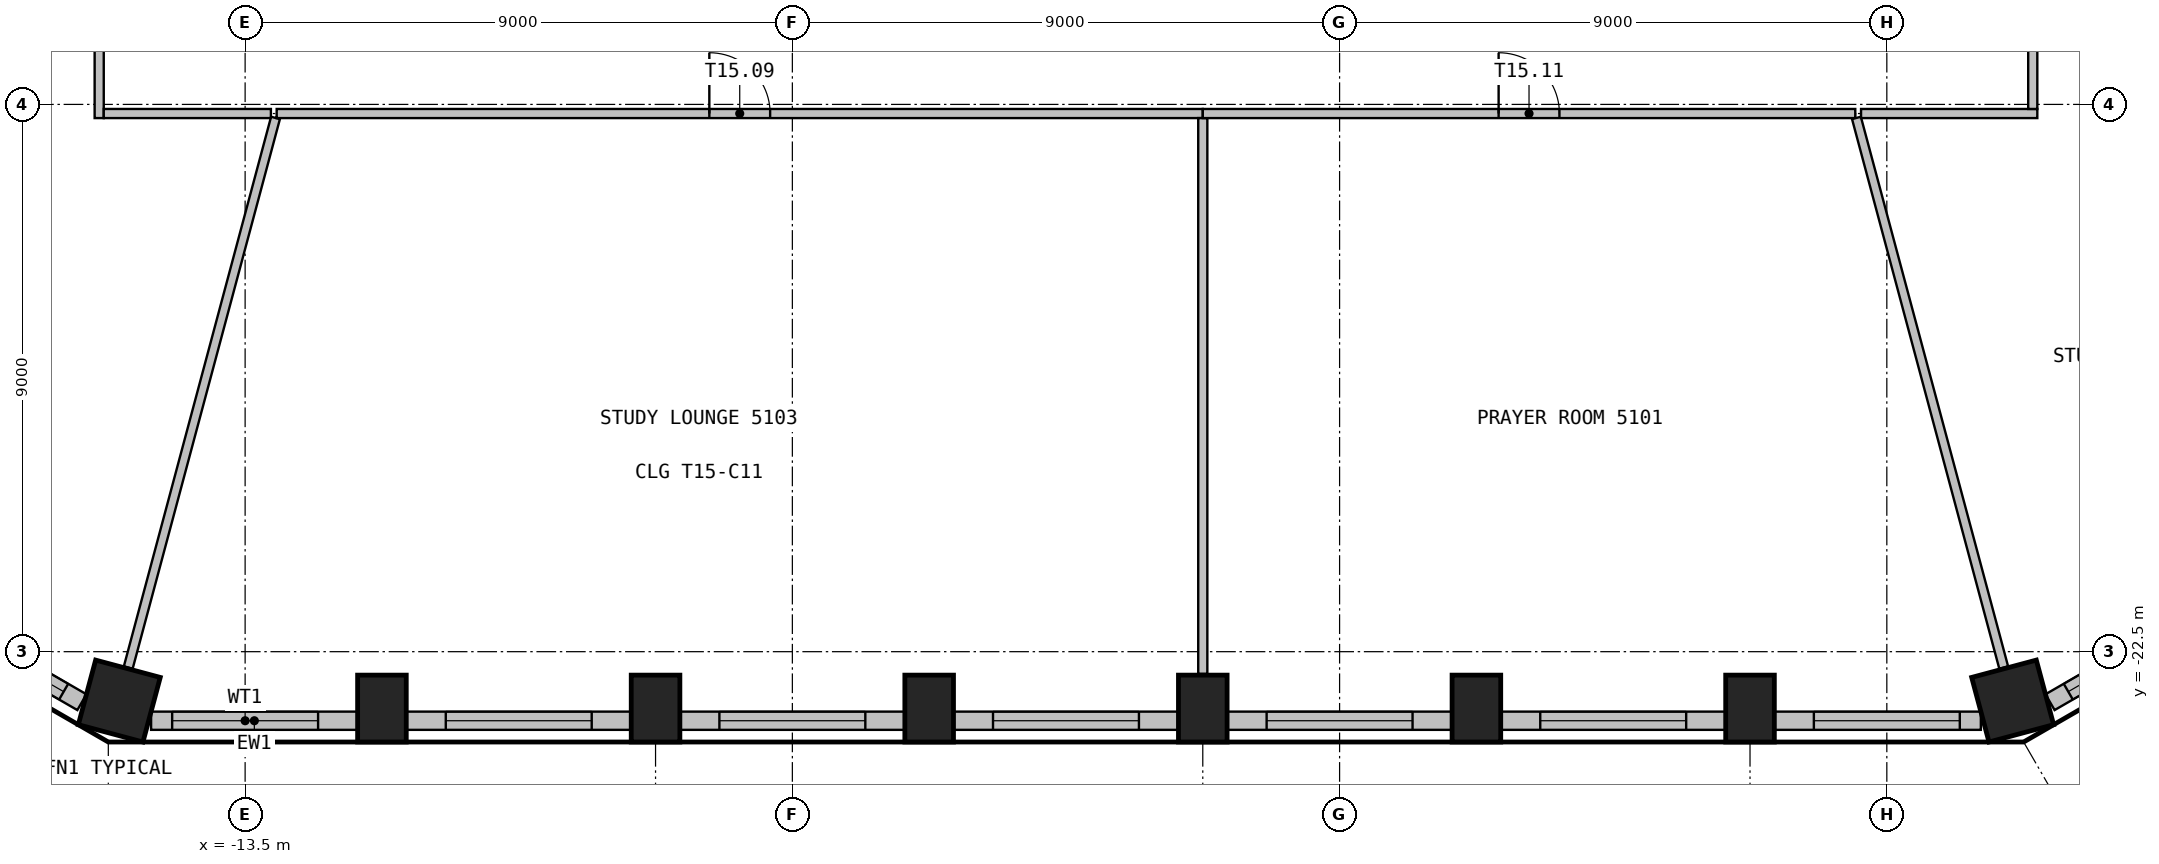
"""IFC4 building model, lengths in metres.
Left out: names, types, materials, properties, quantities, classifications, styles, units other than length and angle.
Written with IfcOpenShell. Run it as: python <this file> out.ifc"""

import sys

from ifc_helpers import new_model, si_unit, direction, frame, frame_2d, origin, origin_2d, place, context, subcontext, project, spatial, rectangle, extrude, element, fill, save


model = new_model("IFC4")
c1 = context("Model", 3, precision=1e-05, world=origin(), true_north=direction((0.0, 1.0)))
c2 = subcontext(c1, "Body", "Model", "MODEL_VIEW")
j1 = project(units=[si_unit("LENGTHUNIT", "METRE"), si_unit("PLANEANGLEUNIT", "RADIAN")], contexts=[c1])
p1 = place(None, origin())
s1 = spatial("IfcSite", under=j1, at=p1, CompositionType="ELEMENT")
p2 = place(p1, origin())
s2 = spatial("IfcBuilding", under=s1, at=p2, CompositionType="ELEMENT")
p3 = place(p2, frame((0.0, 0.0, 207.3)))
s3 = spatial("IfcBuildingStorey", under=s2, at=p3, CompositionType="ELEMENT", Elevation=207.3)
p4 = place(p3, frame((-15.57, -23.312, 0.0), z_axis=(0.0, 0.0, 1.0), x_axis=(0.965925826289, -0.258819045103, 0.0)))
e1 = element("IfcColumn", 1, at=p4, inside=s3, PredefinedType="COLUMN", context=c2, shape_type="SweptSolid", body=[
    extrude(rectangle(XDim=1.1, YDim=1.1, at=origin_2d()), origin(), (0.0, 0.0, 1.0), 3.55),
])
for number, where, z_axis, x_axis in (
    (2, (-11.25, -23.436, 0.0), (0.0, 0.0, 1.0), (1.0, 0.0, 0.0)),
    (3, (-6.75, -23.436, 0.0), (0.0, 0.0, 1.0), (1.0, 0.0, 0.0)),
    (4, (-2.25, -23.436, 0.0), (0.0, 0.0, 1.0), (1.0, 0.0, 0.0)),
    (5, (2.25, -23.436, 0.0), (0.0, 0.0, 1.0), (1.0, 0.0, 0.0)),
    (6, (6.75, -23.436, 0.0), (0.0, 0.0, 1.0), (1.0, 0.0, 0.0)),
    (7, (11.25, -23.436, 0.0), (0.0, 0.0, 1.0), (1.0, 0.0, 0.0)),
):
    element("IfcColumn", number, at=place(p3, frame(where, z_axis=z_axis, x_axis=x_axis)), inside=s3, PredefinedType="COLUMN", context=c2, shape_type="SweptSolid", body=[
        extrude(rectangle(XDim=0.8, YDim=1.1, at=origin_2d()), origin(), (0.0, 0.0, 1.0), 3.55),
    ])
p5 = place(p3, frame((15.57, -23.312, 0.0), z_axis=(0.0, 0.0, 1.0), x_axis=(0.965925826289, 0.258819045103, 0.0)))
e8 = element("IfcColumn", 8, at=p5, inside=s3, PredefinedType="COLUMN", context=c2, shape_type="SweptSolid", body=[
    extrude(rectangle(XDim=1.1, YDim=1.1, at=origin_2d()), origin(), (0.0, 0.0, 1.0), 3.55),
])
p6 = place(p3, frame((-15.046, -23.635, 0.0), z_axis=(0.0, 0.0, 1.0), x_axis=(1.0, 0.0, 0.0)))
e9 = element("IfcWall", 9, at=p6, inside=s3, PredefinedType="SOLIDWALL", context=c2, shape_type="SweptSolid", body=[
    extrude(rectangle(XDim=3.396, YDim=0.3, at=frame_2d((1.698, 0.0))), origin(), (0.0, 0.0, 1.0), 3.55),
])
p7 = place(p6, frame((0.346, 0.0, 0.9)))
e10 = element("IfcOpeningElement", 10, at=p7, cuts=e9, PredefinedType="OPENING", context=c2, shape_type="SweptSolid", body=[
    extrude(rectangle(XDim=2.4, YDim=2.1, at=frame_2d((1.2, 1.05))), frame((0.0, 0.16, 0.0), z_axis=(0.0, -1.0, 0.0), x_axis=(1.0, 0.0, 0.0)), (0.0, 0.0, 1.0), 0.32),
])
p8 = place(p3, frame((-10.85, -23.635, 0.0), z_axis=(0.0, 0.0, 1.0), x_axis=(1.0, 0.0, 0.0)))
e11 = element("IfcWall", 11, at=p8, inside=s3, PredefinedType="SOLIDWALL", context=c2, shape_type="SweptSolid", body=[
    extrude(rectangle(XDim=3.699, YDim=0.3, at=frame_2d((1.85, 0.0))), origin(), (0.0, 0.0, 1.0), 3.55),
])
p9 = place(p8, frame((0.649, 0.0, 0.9)))
e12 = element("IfcOpeningElement", 12, at=p9, cuts=e11, PredefinedType="OPENING", context=c2, shape_type="SweptSolid", body=[
    extrude(rectangle(XDim=2.4, YDim=2.1, at=frame_2d((1.2, 1.05))), frame((0.0, 0.16, 0.0), z_axis=(0.0, -1.0, 0.0), x_axis=(1.0, 0.0, 0.0)), (0.0, 0.0, 1.0), 0.32),
])
p10 = place(p3, frame((-6.35, -23.635, 0.0), z_axis=(0.0, 0.0, 1.0), x_axis=(1.0, 0.0, 0.0)))
e13 = element("IfcWall", 13, at=p10, inside=s3, PredefinedType="SOLIDWALL", context=c2, shape_type="SweptSolid", body=[
    extrude(rectangle(XDim=3.699, YDim=0.3, at=frame_2d((1.85, 0.0))), origin(), (0.0, 0.0, 1.0), 3.55),
])
p11 = place(p10, frame((0.649, 0.0, 0.9)))
e14 = element("IfcOpeningElement", 14, at=p11, cuts=e13, PredefinedType="OPENING", context=c2, shape_type="SweptSolid", body=[
    extrude(rectangle(XDim=2.4, YDim=2.1, at=frame_2d((1.2, 1.05))), frame((0.0, 0.16, 0.0), z_axis=(0.0, -1.0, 0.0), x_axis=(1.0, 0.0, 0.0)), (0.0, 0.0, 1.0), 0.32),
])
p12 = place(p3, frame((-1.85, -23.635, 0.0), z_axis=(0.0, 0.0, 1.0), x_axis=(1.0, 0.0, 0.0)))
e15 = element("IfcWall", 15, at=p12, inside=s3, PredefinedType="SOLIDWALL", context=c2, shape_type="SweptSolid", body=[
    extrude(rectangle(XDim=3.699, YDim=0.3, at=frame_2d((1.85, 0.0))), origin(), (0.0, 0.0, 1.0), 3.55),
])
p13 = place(p12, frame((0.649, 0.0, 0.9)))
e16 = element("IfcOpeningElement", 16, at=p13, cuts=e15, PredefinedType="OPENING", context=c2, shape_type="SweptSolid", body=[
    extrude(rectangle(XDim=2.4, YDim=2.1, at=frame_2d((1.2, 1.05))), frame((0.0, 0.16, 0.0), z_axis=(0.0, -1.0, 0.0), x_axis=(1.0, 0.0, 0.0)), (0.0, 0.0, 1.0), 0.32),
])
p14 = place(p3, frame((2.65, -23.635, 0.0), z_axis=(0.0, 0.0, 1.0), x_axis=(1.0, 0.0, 0.0)))
e17 = element("IfcWall", 17, at=p14, inside=s3, PredefinedType="SOLIDWALL", context=c2, shape_type="SweptSolid", body=[
    extrude(rectangle(XDim=3.699, YDim=0.3, at=frame_2d((1.85, 0.0))), origin(), (0.0, 0.0, 1.0), 3.55),
])
p15 = place(p14, frame((0.649, 0.0, 0.9)))
e18 = element("IfcOpeningElement", 18, at=p15, cuts=e17, PredefinedType="OPENING", context=c2, shape_type="SweptSolid", body=[
    extrude(rectangle(XDim=2.4, YDim=2.1, at=frame_2d((1.2, 1.05))), frame((0.0, 0.16, 0.0), z_axis=(0.0, -1.0, 0.0), x_axis=(1.0, 0.0, 0.0)), (0.0, 0.0, 1.0), 0.32),
])
p16 = place(p3, frame((7.15, -23.635, 0.0), z_axis=(0.0, 0.0, 1.0), x_axis=(1.0, 0.0, 0.0)))
e19 = element("IfcWall", 19, at=p16, inside=s3, PredefinedType="SOLIDWALL", context=c2, shape_type="SweptSolid", body=[
    extrude(rectangle(XDim=3.699, YDim=0.3, at=frame_2d((1.85, 0.0))), origin(), (0.0, 0.0, 1.0), 3.55),
])
p17 = place(p16, frame((0.649, 0.0, 0.9)))
e20 = element("IfcOpeningElement", 20, at=p17, cuts=e19, PredefinedType="OPENING", context=c2, shape_type="SweptSolid", body=[
    extrude(rectangle(XDim=2.4, YDim=2.1, at=frame_2d((1.2, 1.05))), frame((0.0, 0.16, 0.0), z_axis=(0.0, -1.0, 0.0), x_axis=(1.0, 0.0, 0.0)), (0.0, 0.0, 1.0), 0.32),
])
p18 = place(p3, frame((11.65, -23.635, 0.0), z_axis=(0.0, 0.0, 1.0), x_axis=(1.0, 0.0, 0.0)))
e21 = element("IfcWall", 21, at=p18, inside=s3, PredefinedType="SOLIDWALL", context=c2, shape_type="SweptSolid", body=[
    extrude(rectangle(XDim=3.396, YDim=0.3, at=frame_2d((1.698, 0.0))), origin(), (0.0, 0.0, 1.0), 3.55),
])
p19 = place(p18, frame((0.649, 0.0, 0.9)))
e22 = element("IfcOpeningElement", 22, at=p19, cuts=e21, PredefinedType="OPENING", context=c2, shape_type="SweptSolid", body=[
    extrude(rectangle(XDim=2.4, YDim=2.1, at=frame_2d((1.2, 1.05))), frame((0.0, 0.16, 0.0), z_axis=(0.0, -1.0, 0.0), x_axis=(1.0, 0.0, 0.0)), (0.0, 0.0, 1.0), 0.32),
])
p20 = place(p3, frame((16.184, -23.331, 0.0), z_axis=(0.0, 0.0, 1.0), x_axis=(0.865994975416, 0.500052699777, 0.0)))
e23 = element("IfcWall", 23, at=p20, inside=s3, PredefinedType="SOLIDWALL", context=c2, shape_type="SweptSolid", body=[
    extrude(rectangle(XDim=3.093, YDim=0.3, at=frame_2d((1.546, 0.0))), origin(), (0.0, 0.0, 1.0), 3.55),
])
p21 = place(p20, frame((0.346, 0.0, 0.9)))
e24 = element("IfcOpeningElement", 24, at=p21, cuts=e23, PredefinedType="OPENING", context=c2, shape_type="SweptSolid", body=[
    extrude(rectangle(XDim=2.4, YDim=2.1, at=frame_2d((1.2, 1.05))), frame((0.0, 0.16, 0.0), z_axis=(0.0, -1.0, 0.0), x_axis=(1.0, 0.0, 0.0)), (0.0, 0.0, 1.0), 0.32),
])
p22 = place(p3, frame((-18.863, -21.784, 0.0), z_axis=(0.0, 0.0, 1.0), x_axis=(0.865994975416, -0.500052699777, 0.0)))
e25 = element("IfcWall", 25, at=p22, inside=s3, PredefinedType="SOLIDWALL", context=c2, shape_type="SweptSolid", body=[
    extrude(rectangle(XDim=3.093, YDim=0.3, at=frame_2d((1.546, 0.0))), origin(), (0.0, 0.0, 1.0), 3.55),
])
p23 = place(p22, frame((0.346, 0.0, 0.9)))
e26 = element("IfcOpeningElement", 26, at=p23, cuts=e25, PredefinedType="OPENING", context=c2, shape_type="SweptSolid", body=[
    extrude(rectangle(XDim=2.4, YDim=2.1, at=frame_2d((1.2, 1.05))), frame((0.0, 0.16, 0.0), z_axis=(0.0, -1.0, 0.0), x_axis=(1.0, 0.0, 0.0)), (0.0, 0.0, 1.0), 0.32),
])
p24 = place(p3, frame((-15.9, -2.325, 0.0), z_axis=(0.0, 0.0, 1.0), x_axis=(0.0, -1.0, 0.0)))
e27 = element("IfcWall", 27, at=p24, inside=s3, PredefinedType="PARTITIONING", context=c2, shape_type="SweptSolid", body=[
    extrude(rectangle(XDim=11.4, YDim=0.15, at=frame_2d((5.7, 0.0))), origin(), (0.0, 0.0, 1.0), 3.55),
])
p25 = place(p24, frame((5.2, 0.0, 0.0)))
e28 = element("IfcOpeningElement", 28, at=p25, cuts=e27, PredefinedType="OPENING", context=c2, shape_type="SweptSolid", body=[
    extrude(rectangle(XDim=1.0, YDim=2.1, at=frame_2d((0.5, 1.05))), frame((0.0, 0.085, 0.0), z_axis=(0.0, -1.0, 0.0), x_axis=(1.0, 0.0, 0.0)), (0.0, 0.0, 1.0), 0.17),
])
p26 = place(p3, frame((-15.825, -13.65, 0.0), z_axis=(0.0, 0.0, 1.0), x_axis=(1.0, 0.0, 0.0)))
e29 = element("IfcWall", 29, at=p26, inside=s3, PredefinedType="PARTITIONING", context=c2, shape_type="SweptSolid", body=[
    extrude(rectangle(XDim=2.749, YDim=0.15, at=frame_2d((1.375, 0.0))), origin(), (0.0, 0.0, 1.0), 3.55),
])
p27 = place(p3, frame((-13.0, -13.722, 0.0), z_axis=(0.0, 0.0, 1.0), x_axis=(-0.258812157425, -0.96592767181, 0.0)))
e30 = element("IfcWall", 30, at=p27, inside=s3, PredefinedType="PARTITIONING", context=c2, shape_type="SweptSolid", body=[
    extrude(rectangle(XDim=9.358, YDim=0.15, at=frame_2d((4.679, 0.0))), origin(), (0.0, 0.0, 1.0), 3.55),
])
p28 = place(p3, frame((-12.981, -13.65, 0.0), z_axis=(0.0, 0.0, 1.0), x_axis=(1.0, 0.0, 0.0)))
e31 = element("IfcWall", 31, at=p28, inside=s3, PredefinedType="PARTITIONING", context=c2, shape_type="SweptSolid", body=[
    extrude(rectangle(XDim=15.231, YDim=0.15, at=frame_2d((7.615, 0.0))), origin(), (0.0, 0.0, 1.0), 3.55),
])
p29 = place(p28, frame((7.115, 0.0, 0.0)))
e32 = element("IfcOpeningElement", 32, at=p29, cuts=e31, PredefinedType="OPENING", context=c2, shape_type="SweptSolid", body=[
    extrude(rectangle(XDim=1.0, YDim=2.1, at=frame_2d((0.5, 1.05))), frame((0.0, 0.085, 0.0), z_axis=(0.0, -1.0, 0.0), x_axis=(1.0, 0.0, 0.0)), (0.0, 0.0, 1.0), 0.17),
])
p30 = place(p3, frame((2.25, -13.725, 0.0), z_axis=(0.0, 0.0, 1.0), x_axis=(0.0, -1.0, 0.0)))
e33 = element("IfcWall", 33, at=p30, inside=s3, PredefinedType="PARTITIONING", context=c2, shape_type="SweptSolid", body=[
    extrude(rectangle(XDim=9.14, YDim=0.15, at=frame_2d((4.57, 0.0))), origin(), (0.0, 0.0, 1.0), 3.55),
])
p31 = place(p3, frame((2.25, -13.65, 0.0), z_axis=(0.0, 0.0, 1.0), x_axis=(1.0, 0.0, 0.0)))
e34 = element("IfcWall", 34, at=p31, inside=s3, PredefinedType="PARTITIONING", context=c2, shape_type="SweptSolid", body=[
    extrude(rectangle(XDim=10.731, YDim=0.15, at=frame_2d((5.365, 0.0))), origin(), (0.0, 0.0, 1.0), 3.55),
])
p32 = place(p31, frame((4.865, 0.0, 0.0)))
e35 = element("IfcOpeningElement", 35, at=p32, cuts=e34, PredefinedType="OPENING", context=c2, shape_type="SweptSolid", body=[
    extrude(rectangle(XDim=1.0, YDim=2.1, at=frame_2d((0.5, 1.05))), frame((0.0, 0.085, 0.0), z_axis=(0.0, -1.0, 0.0), x_axis=(1.0, 0.0, 0.0)), (0.0, 0.0, 1.0), 0.17),
])
p33 = place(p3, frame((13.0, -13.722, 0.0), z_axis=(0.0, 0.0, 1.0), x_axis=(0.258812157425, -0.96592767181, 0.0)))
e36 = element("IfcWall", 36, at=p33, inside=s3, PredefinedType="PARTITIONING", context=c2, shape_type="SweptSolid", body=[
    extrude(rectangle(XDim=9.358, YDim=0.15, at=frame_2d((4.679, 0.0))), origin(), (0.0, 0.0, 1.0), 3.55),
])
p34 = place(p3, frame((13.076, -13.65, 0.0), z_axis=(0.0, 0.0, 1.0), x_axis=(1.0, 0.0, 0.0)))
e37 = element("IfcWall", 37, at=p34, inside=s3, PredefinedType="PARTITIONING", context=c2, shape_type="SweptSolid", body=[
    extrude(rectangle(XDim=2.899, YDim=0.15, at=frame_2d((1.45, 0.0))), origin(), (0.0, 0.0, 1.0), 3.55),
])
p35 = place(p3, frame((15.9, -13.575, 0.0), z_axis=(0.0, 0.0, 1.0), x_axis=(0.0, 1.0, 0.0)))
e38 = element("IfcWall", 38, at=p35, inside=s3, PredefinedType="PARTITIONING", context=c2, shape_type="SweptSolid", body=[
    extrude(rectangle(XDim=4.265, YDim=0.15, at=frame_2d((2.132, 0.0))), origin(), (0.0, 0.0, 1.0), 3.55),
])
p36 = place(p35, frame((1.633, 0.0, 0.0)))
e39 = element("IfcOpeningElement", 39, at=p36, cuts=e38, PredefinedType="OPENING", context=c2, shape_type="SweptSolid", body=[
    extrude(rectangle(XDim=1.0, YDim=2.1, at=frame_2d((0.5, 1.05))), frame((0.0, 0.085, 0.0), z_axis=(0.0, -1.0, 0.0), x_axis=(1.0, 0.0, 0.0)), (0.0, 0.0, 1.0), 0.17),
])
p37 = place(p7, origin())
e40 = element("IfcWindow", 40, at=p37, inside=s3, PartitioningType="SINGLE_PANEL", PredefinedType="WINDOW", context=c2, shape_type="SweptSolid", body=[
    extrude(rectangle(XDim=2.4, YDim=2.1, at=frame_2d((1.2, 1.05))), frame((0.0, 0.03, 0.0), z_axis=(0.0, -1.0, 0.0), x_axis=(1.0, 0.0, 0.0)), (0.0, 0.0, 1.0), 0.06),
])
fill(e10, e40)
p38 = place(p9, origin())
e41 = element("IfcWindow", 41, at=p38, inside=s3, PartitioningType="SINGLE_PANEL", PredefinedType="WINDOW", context=c2, shape_type="SweptSolid", body=[
    extrude(rectangle(XDim=2.4, YDim=2.1, at=frame_2d((1.2, 1.05))), frame((0.0, 0.03, 0.0), z_axis=(0.0, -1.0, 0.0), x_axis=(1.0, 0.0, 0.0)), (0.0, 0.0, 1.0), 0.06),
])
fill(e12, e41)
p39 = place(p11, origin())
e42 = element("IfcWindow", 42, at=p39, inside=s3, PartitioningType="SINGLE_PANEL", PredefinedType="WINDOW", context=c2, shape_type="SweptSolid", body=[
    extrude(rectangle(XDim=2.4, YDim=2.1, at=frame_2d((1.2, 1.05))), frame((0.0, 0.03, 0.0), z_axis=(0.0, -1.0, 0.0), x_axis=(1.0, 0.0, 0.0)), (0.0, 0.0, 1.0), 0.06),
])
fill(e14, e42)
p40 = place(p13, origin())
e43 = element("IfcWindow", 43, at=p40, inside=s3, PartitioningType="SINGLE_PANEL", PredefinedType="WINDOW", context=c2, shape_type="SweptSolid", body=[
    extrude(rectangle(XDim=2.4, YDim=2.1, at=frame_2d((1.2, 1.05))), frame((0.0, 0.03, 0.0), z_axis=(0.0, -1.0, 0.0), x_axis=(1.0, 0.0, 0.0)), (0.0, 0.0, 1.0), 0.06),
])
fill(e16, e43)
p41 = place(p15, origin())
e44 = element("IfcWindow", 44, at=p41, inside=s3, PartitioningType="SINGLE_PANEL", PredefinedType="WINDOW", context=c2, shape_type="SweptSolid", body=[
    extrude(rectangle(XDim=2.4, YDim=2.1, at=frame_2d((1.2, 1.05))), frame((0.0, 0.03, 0.0), z_axis=(0.0, -1.0, 0.0), x_axis=(1.0, 0.0, 0.0)), (0.0, 0.0, 1.0), 0.06),
])
fill(e18, e44)
p42 = place(p17, origin())
e45 = element("IfcWindow", 45, at=p42, inside=s3, PartitioningType="SINGLE_PANEL", PredefinedType="WINDOW", context=c2, shape_type="SweptSolid", body=[
    extrude(rectangle(XDim=2.4, YDim=2.1, at=frame_2d((1.2, 1.05))), frame((0.0, 0.03, 0.0), z_axis=(0.0, -1.0, 0.0), x_axis=(1.0, 0.0, 0.0)), (0.0, 0.0, 1.0), 0.06),
])
fill(e20, e45)
p43 = place(p19, origin())
e46 = element("IfcWindow", 46, at=p43, inside=s3, PartitioningType="SINGLE_PANEL", PredefinedType="WINDOW", context=c2, shape_type="SweptSolid", body=[
    extrude(rectangle(XDim=2.4, YDim=2.1, at=frame_2d((1.2, 1.05))), frame((0.0, 0.03, 0.0), z_axis=(0.0, -1.0, 0.0), x_axis=(1.0, 0.0, 0.0)), (0.0, 0.0, 1.0), 0.06),
])
fill(e22, e46)
p44 = place(p21, origin())
e47 = element("IfcWindow", 47, at=p44, inside=s3, PartitioningType="SINGLE_PANEL", PredefinedType="WINDOW", context=c2, shape_type="SweptSolid", body=[
    extrude(rectangle(XDim=2.4, YDim=2.1, at=frame_2d((1.2, 1.05))), frame((0.0, 0.03, 0.0), z_axis=(0.0, -1.0, 0.0), x_axis=(1.0, 0.0, 0.0)), (0.0, 0.0, 1.0), 0.06),
])
fill(e24, e47)
p45 = place(p23, origin())
e48 = element("IfcWindow", 48, at=p45, inside=s3, PartitioningType="SINGLE_PANEL", PredefinedType="WINDOW", context=c2, shape_type="SweptSolid", body=[
    extrude(rectangle(XDim=2.4, YDim=2.1, at=frame_2d((1.2, 1.05))), frame((0.0, 0.03, 0.0), z_axis=(0.0, -1.0, 0.0), x_axis=(1.0, 0.0, 0.0)), (0.0, 0.0, 1.0), 0.06),
])
fill(e26, e48)
p46 = place(p29, origin())
e49 = element("IfcDoor", 49, at=p46, inside=s3, OperationType="SINGLE_SWING_RIGHT", PredefinedType="DOOR", context=c2, shape_type="SweptSolid", body=[
    extrude(rectangle(XDim=1.0, YDim=2.1, at=frame_2d((0.5, 1.05))), frame((0.0, 0.025, 0.0), z_axis=(0.0, -1.0, 0.0), x_axis=(1.0, 0.0, 0.0)), (0.0, 0.0, 1.0), 0.05),
])
fill(e32, e49)
p47 = place(p32, origin())
e50 = element("IfcDoor", 50, at=p47, inside=s3, OperationType="SINGLE_SWING_RIGHT", PredefinedType="DOOR", context=c2, shape_type="SweptSolid", body=[
    extrude(rectangle(XDim=1.0, YDim=2.1, at=frame_2d((0.5, 1.05))), frame((0.0, 0.025, 0.0), z_axis=(0.0, -1.0, 0.0), x_axis=(1.0, 0.0, 0.0)), (0.0, 0.0, 1.0), 0.05),
])
fill(e35, e50)
save(model, sys.argv[1])
